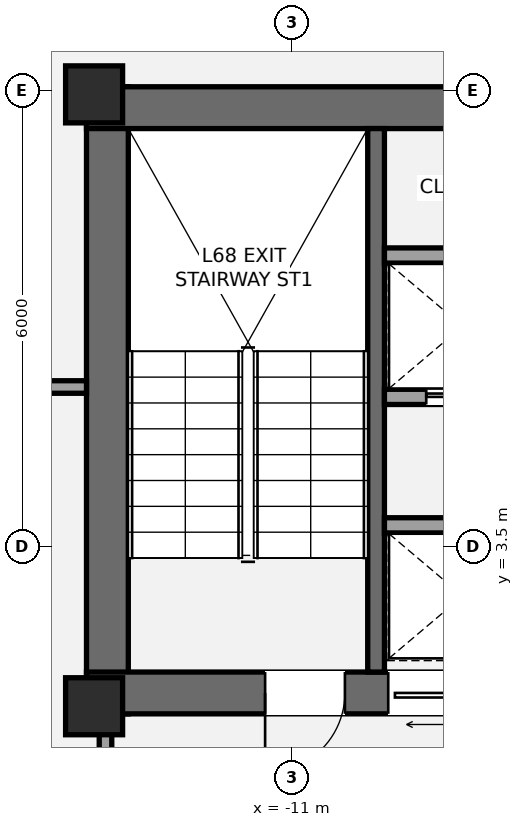
"""IFC4 building model, lengths in metres.
Left out: names, types, materials, properties, quantities, classifications, styles, units other than length and angle.
Written with IfcOpenShell. Run it as: python <this file> out.ifc"""

import sys

from ifc_helpers import new_model, si_unit, direction, frame, frame_2d, origin, origin_2d, place, context, subcontext, project, spatial, rectangle, extrude, element, fill, save


model = new_model("IFC4")
c1 = context("Model", 3, precision=1e-05, world=origin(), true_north=direction((0.0, 1.0)))
c2 = subcontext(c1, "Body", "Model", "MODEL_VIEW")
j1 = project(units=[si_unit("LENGTHUNIT", "METRE"), si_unit("PLANEANGLEUNIT", "RADIAN")], contexts=[c1])
p1 = place(None, origin())
s1 = spatial("IfcSite", under=j1, at=p1, CompositionType="ELEMENT")
p2 = place(p1, origin())
s2 = spatial("IfcBuilding", under=s1, at=p2, CompositionType="ELEMENT")
p3 = place(p2, frame((0.0, 0.0, 241.5)))
s3 = spatial("IfcBuildingStorey", under=s2, at=p3, CompositionType="ELEMENT", Elevation=241.5)
p4 = place(p3, frame((-13.425, 1.3, 0.0), z_axis=(0.0, 0.0, 1.0), x_axis=(0.0, 1.0, 0.0)))
e1 = element("IfcWall", 1, at=p4, inside=s3, PredefinedType="SHEAR", context=c2, shape_type="SweptSolid", body=[
    extrude(rectangle(XDim=8.25, YDim=0.55, at=frame_2d((4.125, 0.0))), origin(), (0.0, 0.0, 1.0), 3.15),
])
p5 = place(p3, frame((-13.7, 9.275, 0.0), z_axis=(0.0, 0.0, 1.0), x_axis=(1.0, 0.0, 0.0)))
e2 = element("IfcWall", 2, at=p5, inside=s3, PredefinedType="SHEAR", context=c2, shape_type="SweptSolid", body=[
    extrude(rectangle(XDim=9.175, YDim=0.55, at=frame_2d((4.587, 0.0))), origin(), (0.0, 0.0, 1.0), 3.15),
])
p6 = place(p3, frame((-4.925, 1.575, 0.0), z_axis=(0.0, 0.0, 1.0), x_axis=(-1.0, 0.0, 0.0)))
e3 = element("IfcWall", 3, at=p6, inside=s3, PredefinedType="SHEAR", context=c2, shape_type="SweptSolid", body=[
    extrude(rectangle(XDim=8.775, YDim=0.55, at=frame_2d((4.387, 0.0))), origin(), (0.0, 0.0, 1.0), 3.15),
])
p7 = place(p6, frame((5.375, 0.0, 0.0)))
e4 = element("IfcOpeningElement", 4, at=p7, cuts=e3, PredefinedType="OPENING", context=c2, shape_type="SweptSolid", body=[
    extrude(rectangle(XDim=1.05, YDim=2.15, at=frame_2d((0.525, 1.075))), frame((0.0, 0.285, 0.0), z_axis=(0.0, -1.0, 0.0), x_axis=(1.0, 0.0, 0.0)), (0.0, 0.0, 1.0), 0.57),
])
p8 = place(p6, frame((3.705, 0.0, 0.0)))
e5 = element("IfcOpeningElement", 5, at=p8, cuts=e3, PredefinedType="OPENING", context=c2, shape_type="SweptSolid", body=[
    extrude(rectangle(XDim=1.1, YDim=2.2, at=frame_2d((0.55, 1.1))), frame((0.0, 0.285, 0.0), z_axis=(0.0, -1.0, 0.0), x_axis=(1.0, 0.0, 0.0)), (0.0, 0.0, 1.0), 0.57),
])
p9 = place(p3, frame((-9.89, 1.85, 0.0), z_axis=(0.0, 0.0, 1.0), x_axis=(0.0, 1.0, 0.0)))
e6 = element("IfcWall", 6, at=p9, inside=s3, PredefinedType="SHEAR", context=c2, shape_type="SweptSolid", body=[
    extrude(rectangle(XDim=7.15, YDim=0.22, at=frame_2d((3.575, 0.0))), origin(), (0.0, 0.0, 1.0), 3.15),
])
for number, where, z_axis, x_axis in (
    (7, (-13.6, 1.4, 0.0), (0.0, 0.0, 1.0), (1.0, 0.0, 0.0)),
    (8, (-13.6, 9.45, 0.0), (0.0, 0.0, 1.0), (1.0, 0.0, 0.0)),
):
    element("IfcColumn", number, at=place(p3, frame(where, z_axis=z_axis, x_axis=x_axis)), inside=s3, PredefinedType="PILASTER", context=c2, shape_type="SweptSolid", body=[
        extrude(rectangle(XDim=0.75, YDim=0.75, at=origin_2d()), origin(), (0.0, 0.0, 1.0), 3.15),
    ])
p10 = place(p3, frame((-17.381, 9.559, 0.0), z_axis=(0.0, 0.0, 1.0), x_axis=(0.827637036896, 0.561263694851, 0.0)))
e9 = element("IfcWall", 9, at=p10, inside=s3, PredefinedType="STANDARD", context=c2, shape_type="SweptSolid", body=[
    extrude(rectangle(XDim=3.793, YDim=0.44, at=frame_2d((1.896, 0.0))), origin(), (0.0, 0.0, 1.0), 2.336),
])
p11 = place(p10, frame((0.648, 0.0, 0.55)))
e10 = element("IfcOpeningElement", 10, at=p11, cuts=e9, PredefinedType="OPENING", context=c2, shape_type="SweptSolid", body=[
    extrude(rectangle(XDim=1.75, YDim=1.55, at=frame_2d((0.875, 0.775))), frame((0.0, 0.23, 0.0), z_axis=(0.0, -1.0, 0.0), x_axis=(1.0, 0.0, 0.0)), (0.0, 0.0, 1.0), 0.46),
])
p12 = place(p3, frame((-13.45, -2.15, 0.0), z_axis=(0.0, 0.0, 1.0), x_axis=(0.0, 1.0, 0.0)))
e11 = element("IfcWall", 11, at=p12, inside=s3, PredefinedType="PARTITIONING", context=c2, shape_type="SweptSolid", body=[
    extrude(rectangle(XDim=3.5, YDim=0.165, at=frame_2d((1.75, 0.0))), origin(), (0.0, 0.0, 1.0), 2.423),
])
p13 = place(p12, frame((0.67, 0.0, 0.0)))
e12 = element("IfcOpeningElement", 12, at=p13, cuts=e11, PredefinedType="OPENING", context=c2, shape_type="SweptSolid", body=[
    extrude(rectangle(XDim=1.05, YDim=2.15, at=frame_2d((0.525, 1.075))), frame((0.0, 0.093, 0.0), z_axis=(0.0, -1.0, 0.0), x_axis=(1.0, 0.0, 0.0)), (0.0, 0.0, 1.0), 0.185),
])
p14 = place(p3, frame((-9.78, 3.78, 0.0), z_axis=(0.0, 0.0, 1.0), x_axis=(1.0, 0.0, 0.0)))
e13 = element("IfcWall", 13, at=p14, inside=s3, PredefinedType="SOLIDWALL", context=c2, shape_type="SweptSolid", body=[
    extrude(rectangle(XDim=4.305, YDim=0.2, at=frame_2d((2.152, 0.0))), origin(), (0.0, 0.0, 1.0), 2.97),
])
p15 = place(p14, frame((2.72, 0.0, 0.0)))
e14 = element("IfcOpeningElement", 14, at=p15, cuts=e13, PredefinedType="OPENING", context=c2, shape_type="SweptSolid", body=[
    extrude(rectangle(XDim=1.1, YDim=2.2, at=frame_2d((0.55, 1.1))), frame((0.0, 0.11, 0.0), z_axis=(0.0, -1.0, 0.0), x_axis=(1.0, 0.0, 0.0)), (0.0, 0.0, 1.0), 0.22),
])
p16 = place(p3, frame((-9.78, 5.47, 0.0), z_axis=(0.0, 0.0, 1.0), x_axis=(1.0, 0.0, 0.0)))
e15 = element("IfcWall", 15, at=p16, inside=s3, PredefinedType="SOLIDWALL", context=c2, shape_type="SweptSolid", body=[
    extrude(rectangle(XDim=4.305, YDim=0.2, at=frame_2d((2.152, 0.0))), origin(), (0.0, 0.0, 1.0), 2.97),
])
p17 = place(p16, frame((0.55, 0.0, 0.0)))
e16 = element("IfcOpeningElement", 16, at=p17, cuts=e15, PredefinedType="OPENING", context=c2, shape_type="SweptSolid", body=[
    extrude(rectangle(XDim=1.1, YDim=2.2, at=frame_2d((0.55, 1.1))), frame((0.0, 0.11, 0.0), z_axis=(0.0, -1.0, 0.0), x_axis=(1.0, 0.0, 0.0)), (0.0, 0.0, 1.0), 0.22),
])
p18 = place(p16, frame((2.72, 0.0, 0.0)))
e17 = element("IfcOpeningElement", 17, at=p18, cuts=e15, PredefinedType="OPENING", context=c2, shape_type="SweptSolid", body=[
    extrude(rectangle(XDim=1.1, YDim=2.2, at=frame_2d((0.55, 1.1))), frame((0.0, 0.11, 0.0), z_axis=(0.0, -1.0, 0.0), x_axis=(1.0, 0.0, 0.0)), (0.0, 0.0, 1.0), 0.22),
])
p19 = place(p3, frame((-9.78, 7.33, 0.0), z_axis=(0.0, 0.0, 1.0), x_axis=(1.0, 0.0, 0.0)))
e18 = element("IfcWall", 18, at=p19, inside=s3, PredefinedType="SOLIDWALL", context=c2, shape_type="SweptSolid", body=[
    extrude(rectangle(XDim=4.305, YDim=0.2, at=frame_2d((2.152, 0.0))), origin(), (0.0, 0.0, 1.0), 2.97),
])
p20 = place(p3, frame((-20.06, 5.6, 0.0), z_axis=(0.0, 0.0, 1.0), x_axis=(1.0, 0.0, 0.0)))
e19 = element("IfcWall", 19, at=p20, inside=s3, PredefinedType="PARTITIONING", context=c2, shape_type="SweptSolid", body=[
    extrude(rectangle(XDim=6.36, YDim=0.165, at=frame_2d((3.18, 0.0))), origin(), (0.0, 0.0, 1.0), 2.423),
])
p21 = place(p20, frame((2.259, 0.0, 0.0)))
e20 = element("IfcOpeningElement", 20, at=p21, cuts=e19, PredefinedType="OPENING", context=c2, shape_type="SweptSolid", body=[
    extrude(rectangle(XDim=0.9, YDim=2.1, at=frame_2d((0.45, 1.05))), frame((0.0, 0.093, 0.0), z_axis=(0.0, -1.0, 0.0), x_axis=(1.0, 0.0, 0.0)), (0.0, 0.0, 1.0), 0.185),
])
p22 = place(p7, origin())
e21 = element("IfcDoor", 21, at=p22, inside=s3, OperationType="SINGLE_SWING_RIGHT", PredefinedType="DOOR", context=c2, shape_type="SweptSolid", body=[
    extrude(rectangle(XDim=1.05, YDim=2.15, at=frame_2d((0.525, 1.075))), frame((0.0, 0.025, 0.0), z_axis=(0.0, -1.0, 0.0), x_axis=(1.0, 0.0, 0.0)), (0.0, 0.0, 1.0), 0.05),
])
fill(e4, e21)
p23 = place(p8, origin())
e22 = element("IfcDoor", 22, at=p23, inside=s3, OperationType="SLIDING_TO_LEFT", PredefinedType="DOOR", context=c2, shape_type="SweptSolid", body=[
    extrude(rectangle(XDim=1.1, YDim=2.2, at=frame_2d((0.55, 1.1))), frame((0.0, 0.025, 0.0), z_axis=(0.0, -1.0, 0.0), x_axis=(1.0, 0.0, 0.0)), (0.0, 0.0, 1.0), 0.05),
])
fill(e5, e22)
p24 = place(p17, origin())
e23 = element("IfcDoor", 23, at=p24, inside=s3, OperationType="SLIDING_TO_LEFT", PredefinedType="DOOR", context=c2, shape_type="SweptSolid", body=[
    extrude(rectangle(XDim=1.1, YDim=2.2, at=frame_2d((0.55, 1.1))), frame((0.0, 0.025, 0.0), z_axis=(0.0, -1.0, 0.0), x_axis=(1.0, 0.0, 0.0)), (0.0, 0.0, 1.0), 0.05),
])
fill(e16, e23)
save(model, sys.argv[1])
